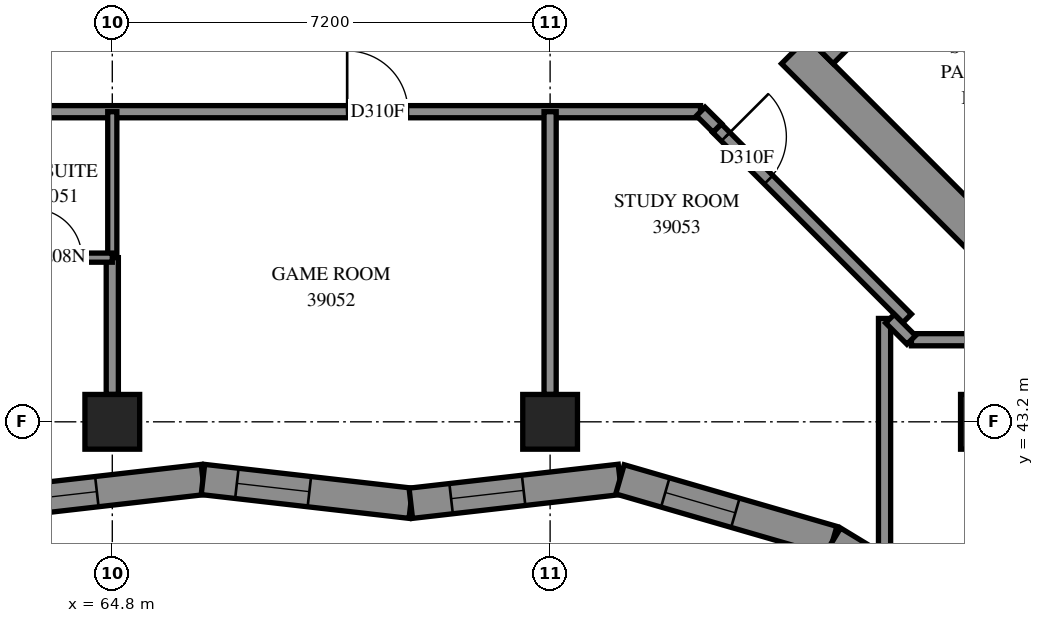
"""IFC4 building model, lengths in metres.
Left out: names, types, materials, properties, quantities, classifications, styles, units other than length and angle.
Written with IfcOpenShell. Run it as: python <this file> out.ifc"""

import sys

from ifc_helpers import new_model, si_unit, direction, frame, frame_2d, origin, origin_2d, place, context, subcontext, project, spatial, polyline, rectangle, outline, extrude, element, fill, save


model = new_model("IFC4")
c1 = context("Model", 3, precision=1e-05, world=origin(), true_north=direction((0.0, 1.0)))
c2 = subcontext(c1, "Body", "Model", "MODEL_VIEW")
j1 = project(units=[si_unit("LENGTHUNIT", "METRE"), si_unit("PLANEANGLEUNIT", "RADIAN")], contexts=[c1])
p1 = place(None, origin())
s1 = spatial("IfcSite", under=j1, at=p1, CompositionType="ELEMENT")
p2 = place(p1, origin())
s2 = spatial("IfcBuilding", under=s1, at=p2, CompositionType="ELEMENT")
p3 = place(p2, frame((0.0, 0.0, 145.6)))
s3 = spatial("IfcBuildingStorey", under=s2, at=p3, CompositionType="ELEMENT", Elevation=145.6)
for number, where, z_axis, x_axis in (
    (1, (64.8, 43.2, 0.0), (0.0, 0.0, 1.0), (1.0, 0.0, 0.0)),
    (2, (72.0, 43.2, 0.0), (0.0, 0.0, 1.0), (1.0, 0.0, 0.0)),
    (3, (79.2, 43.2, 0.0), (0.0, 0.0, 1.0), (1.0, 0.0, 0.0)),
):
    element("IfcColumn", number, at=place(p3, frame(where, z_axis=z_axis, x_axis=x_axis)), inside=s3, PredefinedType="COLUMN", context=c2, shape_type="SweptSolid", body=[
        extrude(rectangle(XDim=0.9, YDim=0.9, at=origin_2d()), origin(), (0.0, 0.0, 1.0), 3.1),
    ])
p4 = place(p3, frame((76.018, 49.302, -0.3), z_axis=(0.0, 0.0, 1.0), x_axis=(0.7071067812, -0.7071067812, 0.0)))
e4 = element("IfcWall", 4, at=p4, inside=s3, PredefinedType="SHEAR", context=c2, shape_type="SweptSolid", body=[
    extrude(rectangle(XDim=15.6, YDim=0.6, at=frame_2d((7.8, 0.0))), origin(), (0.0, 0.0, 1.0), 2.7),
])
p5 = place(p3, frame((76.442, 49.302, -0.3), z_axis=(0.0, 0.0, 1.0), x_axis=(0.7071067812, 0.7071067812, 0.0)))
e5 = element("IfcWall", 5, at=p5, inside=s3, PredefinedType="SHEAR", context=c2, shape_type="SweptSolid", body=[
    extrude(rectangle(XDim=14.4, YDim=0.6, at=frame_2d((7.2, 0.0))), origin(), (0.0, 0.0, 1.0), 2.7),
])
p6 = place(p5, frame((4.55, 0.0, 0.3)))
e6 = element("IfcOpeningElement", 6, at=p6, cuts=e5, PredefinedType="OPENING", context=c2, shape_type="SweptSolid", body=[
    extrude(rectangle(XDim=1.1, YDim=2.1, at=frame_2d((0.55, 1.05))), frame((0.0, 0.31, 0.0), z_axis=(0.0, -1.0, 0.0), x_axis=(1.0, 0.0, 0.0)), (0.0, 0.0, 1.0), 0.62),
])
p7 = place(p5, frame((11.35, 0.0, 0.3)))
e7 = element("IfcOpeningElement", 7, at=p7, cuts=e5, PredefinedType="OPENING", context=c2, shape_type="SweptSolid", body=[
    extrude(rectangle(XDim=1.1, YDim=2.1, at=frame_2d((0.55, 1.05))), frame((0.0, 0.31, 0.0), z_axis=(0.0, -1.0, 0.0), x_axis=(1.0, 0.0, 0.0)), (0.0, 0.0, 1.0), 0.62),
])
p8 = place(p3, frame((62.873, 41.861, 0.0), z_axis=(0.0, 0.0, 1.0), x_axis=(0.9935212381, 0.1136465988, 0.0)))
e8 = element("IfcWall", 8, at=p8, inside=s3, PredefinedType="SOLIDWALL", context=c2, shape_type="SweptSolid", body=[
    extrude(outline(polyline([(-0.029, -0.25), (3.412, -0.25), (3.469, 0.25), (0.029, 0.25), (-0.029, -0.25)])), origin(), (0.0, 0.0, 1.0), 3.1),
])
p9 = place(p8, frame((0.484, 0.0, 0.45)))
e9 = element("IfcOpeningElement", 9, at=p9, cuts=e8, PredefinedType="OPENING", context=c2, shape_type="SweptSolid", body=[
    extrude(rectangle(XDim=1.2, YDim=2.5, at=frame_2d((0.6, 1.25))), frame((0.0, 0.26, 0.0), z_axis=(0.0, -1.0, 0.0), x_axis=(1.0, 0.0, 0.0)), (0.0, 0.0, 1.0), 0.52),
])
p10 = place(p3, frame((66.291, 42.252, 0.0), z_axis=(0.0, 0.0, 1.0), x_axis=(0.9935212381, -0.1136465988, 0.0)))
e10 = element("IfcWall", 10, at=p10, inside=s3, PredefinedType="SOLIDWALL", context=c2, shape_type="SweptSolid", body=[
    extrude(outline(polyline([(0.029, -0.25), (3.469, -0.25), (3.412, 0.25), (-0.029, 0.25), (0.029, -0.25)])), origin(), (0.0, 0.0, 1.0), 3.1),
])
p11 = place(p10, frame((0.561, 0.0, 0.45)))
e11 = element("IfcOpeningElement", 11, at=p11, cuts=e10, PredefinedType="OPENING", context=c2, shape_type="SweptSolid", body=[
    extrude(rectangle(XDim=1.2, YDim=2.5, at=frame_2d((0.6, 1.25))), frame((0.0, 0.26, 0.0), z_axis=(0.0, -1.0, 0.0), x_axis=(1.0, 0.0, 0.0)), (0.0, 0.0, 1.0), 0.52),
])
p12 = place(p3, frame((69.709, 41.861, 0.0), z_axis=(0.0, 0.0, 1.0), x_axis=(0.9935195387, 0.1136614544, 0.0)))
e12 = element("IfcWall", 12, at=p12, inside=s3, PredefinedType="SOLIDWALL", context=c2, shape_type="SweptSolid", body=[
    extrude(outline(polyline([(-0.029, -0.25), (3.412, -0.25), (3.512, 0.25), (0.029, 0.25), (-0.029, -0.25)])), origin(), (0.0, 0.0, 1.0), 3.1),
])
p13 = place(p12, frame((0.667, 0.0, 0.45)))
e13 = element("IfcOpeningElement", 13, at=p13, cuts=e12, PredefinedType="OPENING", context=c2, shape_type="SweptSolid", body=[
    extrude(rectangle(XDim=1.2, YDim=2.5, at=frame_2d((0.6, 1.25))), frame((0.0, 0.26, 0.0), z_axis=(0.0, -1.0, 0.0), x_axis=(1.0, 0.0, 0.0)), (0.0, 0.0, 1.0), 0.52),
])
p14 = place(p3, frame((73.149, 42.254, 0.0), z_axis=(0.0, 0.0, 1.0), x_axis=(0.9604495537, -0.2784540442, 0.0)))
e14 = element("IfcWall", 14, at=p14, inside=s3, PredefinedType="SOLIDWALL", context=c2, shape_type="SweptSolid", body=[
    extrude(outline(polyline([(0.05, -0.25), (3.609, -0.25), (3.675, 0.25), (-0.05, 0.25), (0.05, -0.25)])), origin(), (0.0, 0.0, 1.0), 3.1),
])
p15 = place(p14, frame((0.776, 0.0, 0.45)))
e15 = element("IfcOpeningElement", 15, at=p15, cuts=e14, PredefinedType="OPENING", context=c2, shape_type="SweptSolid", body=[
    extrude(rectangle(XDim=1.2, YDim=2.5, at=frame_2d((0.6, 1.25))), frame((0.0, 0.26, 0.0), z_axis=(0.0, -1.0, 0.0), x_axis=(1.0, 0.0, 0.0)), (0.0, 0.0, 1.0), 0.52),
])
p16 = place(p3, frame((76.647, 41.24, 0.0), z_axis=(0.0, 0.0, 1.0), x_axis=(0.8545971976, -0.5192914691, 0.0)))
e16 = element("IfcWall", 16, at=p16, inside=s3, PredefinedType="SOLIDWALL", context=c2, shape_type="SweptSolid", body=[
    extrude(outline(polyline([(0.033, -0.25), (4.213, -0.25), (4.298, 0.25), (-0.033, 0.25), (0.033, -0.25)])), origin(), (0.0, 0.0, 1.0), 3.1),
])
p17 = place(p16, frame((0.952, 0.0, 0.45)))
e17 = element("IfcOpeningElement", 17, at=p17, cuts=e16, PredefinedType="OPENING", context=c2, shape_type="SweptSolid", body=[
    extrude(rectangle(XDim=1.2, YDim=2.5, at=frame_2d((0.6, 1.25))), frame((0.0, 0.26, 0.0), z_axis=(0.0, -1.0, 0.0), x_axis=(1.0, 0.0, 0.0)), (0.0, 0.0, 1.0), 0.52),
])
p18 = place(p16, frame((2.729, 0.0, 0.45)))
e18 = element("IfcOpeningElement", 18, at=p18, cuts=e16, PredefinedType="OPENING", context=c2, shape_type="SweptSolid", body=[
    extrude(rectangle(XDim=1.2, YDim=2.5, at=frame_2d((0.6, 1.25))), frame((0.0, 0.26, 0.0), z_axis=(0.0, -1.0, 0.0), x_axis=(1.0, 0.0, 0.0)), (0.0, 0.0, 1.0), 0.52),
])
p19 = place(p3, frame((55.5, 48.3, 0.0), z_axis=(0.0, 0.0, 1.0), x_axis=(1.0, 0.0, 0.0)))
e19 = element("IfcWall", 19, at=p19, inside=s3, PredefinedType="PARTITIONING", context=c2, shape_type="SweptSolid", body=[
    extrude(rectangle(XDim=18.974, YDim=0.2, at=frame_2d((9.487, 0.0))), origin(), (0.0, 0.0, 1.0), 3.1),
])
p20 = place(p19, frame((4.4, 0.0, 0.0)))
e20 = element("IfcOpeningElement", 20, at=p20, cuts=e19, PredefinedType="OPENING", context=c2, shape_type="SweptSolid", body=[
    extrude(rectangle(XDim=0.9, YDim=2.1, at=frame_2d((0.45, 1.05))), frame((0.0, 0.11, 0.0), z_axis=(0.0, -1.0, 0.0), x_axis=(1.0, 0.0, 0.0)), (0.0, 0.0, 1.0), 0.22),
])
p21 = place(p19, frame((6.1, 0.0, 0.0)))
e21 = element("IfcOpeningElement", 21, at=p21, cuts=e19, PredefinedType="OPENING", context=c2, shape_type="SweptSolid", body=[
    extrude(rectangle(XDim=0.9, YDim=2.1, at=frame_2d((0.45, 1.05))), frame((0.0, 0.11, 0.0), z_axis=(0.0, -1.0, 0.0), x_axis=(1.0, 0.0, 0.0)), (0.0, 0.0, 1.0), 0.22),
])
p22 = place(p19, frame((13.162, 0.0, 0.0)))
e22 = element("IfcOpeningElement", 22, at=p22, cuts=e19, PredefinedType="OPENING", context=c2, shape_type="SweptSolid", body=[
    extrude(rectangle(XDim=1.0, YDim=2.1, at=frame_2d((0.5, 1.05))), frame((0.0, 0.11, 0.0), z_axis=(0.0, -1.0, 0.0), x_axis=(1.0, 0.0, 0.0)), (0.0, 0.0, 1.0), 0.22),
])
p23 = place(p3, frame((72.0, 43.65, 0.0), z_axis=(0.0, 0.0, 1.0), x_axis=(0.0, 1.0, 0.0)))
e23 = element("IfcWall", 23, at=p23, inside=s3, PredefinedType="PARTITIONING", context=c2, shape_type="SweptSolid", body=[
    extrude(rectangle(XDim=4.65, YDim=0.2, at=frame_2d((2.325, 0.0))), origin(), (0.0, 0.0, 1.0), 3.1),
])
p24 = place(p3, frame((74.745, 48.029, 0.0), z_axis=(0.0, 0.0, 1.0), x_axis=(0.7068806156, -0.7073328745, 0.0)))
e24 = element("IfcWall", 24, at=p24, inside=s3, PredefinedType="PARTITIONING", context=c2, shape_type="SweptSolid", body=[
    extrude(rectangle(XDim=4.422, YDim=0.2, at=frame_2d((2.211, 0.0))), origin(), (0.0, 0.0, 1.0), 3.1),
])
p25 = place(p24, frame((0.199, 0.0, 0.0)))
e25 = element("IfcOpeningElement", 25, at=p25, cuts=e24, PredefinedType="OPENING", context=c2, shape_type="SweptSolid", body=[
    extrude(rectangle(XDim=1.0, YDim=2.1, at=frame_2d((0.5, 1.05))), frame((0.0, 0.11, 0.0), z_axis=(0.0, -1.0, 0.0), x_axis=(1.0, 0.0, 0.0)), (0.0, 0.0, 1.0), 0.22),
])
p26 = place(p3, frame((77.5, 41.014, 0.0), z_axis=(0.0, 0.0, 1.0), x_axis=(0.0, 1.0, 0.0)))
e26 = element("IfcWall", 26, at=p26, inside=s3, PredefinedType="PARTITIONING", context=c2, shape_type="SweptSolid", body=[
    extrude(rectangle(XDim=3.886, YDim=0.2, at=frame_2d((1.943, 0.0))), origin(), (0.0, 0.0, 1.0), 3.1),
])
p27 = place(p3, frame((64.8, 45.9, 0.0), z_axis=(0.0, 0.0, 1.0), x_axis=(0.0, 1.0, 0.0)))
e27 = element("IfcWall", 27, at=p27, inside=s3, PredefinedType="PARTITIONING", context=c2, shape_type="SweptSolid", body=[
    extrude(rectangle(XDim=2.4, YDim=0.15, at=frame_2d((1.2, 0.0))), origin(), (0.0, 0.0, 1.0), 3.1),
])
p28 = place(p3, frame((77.942, 44.55, 0.0), z_axis=(0.0, 0.0, 1.0), x_axis=(1.0, 0.0, 0.0)))
e28 = element("IfcWall", 28, at=p28, inside=s3, PredefinedType="PARTITIONING", context=c2, shape_type="SweptSolid", body=[
    extrude(rectangle(XDim=2.29, YDim=0.2, at=frame_2d((1.145, 0.0))), origin(), (0.0, 0.0, 1.0), 3.1),
])
p29 = place(p3, frame((64.8, 43.65, 0.0), z_axis=(0.0, 0.0, 1.0), x_axis=(0.0, 1.0, 0.0)))
e29 = element("IfcWall", 29, at=p29, inside=s3, PredefinedType="PARTITIONING", context=c2, shape_type="SweptSolid", body=[
    extrude(rectangle(XDim=2.25, YDim=0.2, at=frame_2d((1.125, 0.0))), origin(), (0.0, 0.0, 1.0), 3.1),
])
p30 = place(p3, frame((62.9, 45.9, 0.0), z_axis=(0.0, 0.0, 1.0), x_axis=(1.0, 0.0, 0.0)))
e30 = element("IfcWall", 30, at=p30, inside=s3, PredefinedType="PARTITIONING", context=c2, shape_type="SweptSolid", body=[
    extrude(rectangle(XDim=1.9, YDim=0.15, at=frame_2d((0.95, 0.0))), origin(), (0.0, 0.0, 1.0), 3.1),
])
p31 = place(p30, frame((0.598, 0.0, 0.0)))
e31 = element("IfcOpeningElement", 31, at=p31, cuts=e30, PredefinedType="OPENING", context=c2, shape_type="SweptSolid", body=[
    extrude(rectangle(XDim=0.8, YDim=2.1, at=frame_2d((0.4, 1.05))), frame((0.0, 0.085, 0.0), z_axis=(0.0, -1.0, 0.0), x_axis=(1.0, 0.0, 0.0)), (0.0, 0.0, 1.0), 0.17),
])
p32 = place(p3, frame((77.588, 44.897, 0.0), z_axis=(0.0, 0.0, 1.0), x_axis=(0.7071067812, -0.7071067812, 0.0)))
e32 = element("IfcWall", 32, at=p32, inside=s3, PredefinedType="PARTITIONING", context=c2, shape_type="SweptSolid", body=[
    extrude(rectangle(XDim=0.495, YDim=0.2, at=frame_2d((0.247, 0.0))), origin(), (0.0, 0.0, 1.0), 3.1),
])
p33 = place(p3, frame((74.477, 48.303, 0.0), z_axis=(0.0, 0.0, 1.0), x_axis=(0.7097111995, -0.7044927348, 0.0)))
e33 = element("IfcWall", 33, at=p33, inside=s3, PredefinedType="PARTITIONING", context=c2, shape_type="SweptSolid", body=[
    extrude(rectangle(XDim=0.383, YDim=0.2, at=frame_2d((0.192, 0.0))), origin(), (0.0, 0.0, 1.0), 3.1),
])
p34 = place(p9, origin())
e34 = element("IfcWindow", 34, at=p34, inside=s3, PartitioningType="SINGLE_PANEL", PredefinedType="WINDOW", context=c2, shape_type="SweptSolid", body=[
    extrude(rectangle(XDim=1.2, YDim=2.5, at=frame_2d((0.6, 1.25))), frame((0.0, 0.18, 0.0), z_axis=(0.0, -1.0, 0.0), x_axis=(1.0, 0.0, 0.0)), (0.0, 0.0, 1.0), 0.06),
])
fill(e9, e34)
p35 = place(p11, origin())
e35 = element("IfcWindow", 35, at=p35, inside=s3, PartitioningType="SINGLE_PANEL", PredefinedType="WINDOW", context=c2, shape_type="SweptSolid", body=[
    extrude(rectangle(XDim=1.2, YDim=2.5, at=frame_2d((0.6, 1.25))), frame((0.0, 0.18, 0.0), z_axis=(0.0, -1.0, 0.0), x_axis=(1.0, 0.0, 0.0)), (0.0, 0.0, 1.0), 0.06),
])
fill(e11, e35)
p36 = place(p13, origin())
e36 = element("IfcWindow", 36, at=p36, inside=s3, PartitioningType="SINGLE_PANEL", PredefinedType="WINDOW", context=c2, shape_type="SweptSolid", body=[
    extrude(rectangle(XDim=1.2, YDim=2.5, at=frame_2d((0.6, 1.25))), frame((0.0, 0.18, 0.0), z_axis=(0.0, -1.0, 0.0), x_axis=(1.0, 0.0, 0.0)), (0.0, 0.0, 1.0), 0.06),
])
fill(e13, e36)
p37 = place(p15, origin())
e37 = element("IfcWindow", 37, at=p37, inside=s3, PartitioningType="SINGLE_PANEL", PredefinedType="WINDOW", context=c2, shape_type="SweptSolid", body=[
    extrude(rectangle(XDim=1.2, YDim=2.5, at=frame_2d((0.6, 1.25))), frame((0.0, 0.18, 0.0), z_axis=(0.0, -1.0, 0.0), x_axis=(1.0, 0.0, 0.0)), (0.0, 0.0, 1.0), 0.06),
])
fill(e15, e37)
p38 = place(p31, origin())
e38 = element("IfcDoor", 38, at=p38, inside=s3, OperationType="SINGLE_SWING_RIGHT", PredefinedType="DOOR", context=c2, shape_type="SweptSolid", body=[
    extrude(rectangle(XDim=0.8, YDim=2.1, at=frame_2d((0.4, 1.05))), frame((0.0, 0.025, 0.0), z_axis=(0.0, -1.0, 0.0), x_axis=(1.0, 0.0, 0.0)), (0.0, 0.0, 1.0), 0.05),
])
fill(e31, e38)
p39 = place(p22, origin())
e39 = element("IfcDoor", 39, at=p39, inside=s3, OperationType="SINGLE_SWING_LEFT", PredefinedType="DOOR", context=c2, shape_type="SweptSolid", body=[
    extrude(rectangle(XDim=1.0, YDim=2.1, at=frame_2d((0.5, 1.05))), frame((0.0, 0.025, 0.0), z_axis=(0.0, -1.0, 0.0), x_axis=(1.0, 0.0, 0.0)), (0.0, 0.0, 1.0), 0.05),
])
fill(e22, e39)
p40 = place(p25, origin())
e40 = element("IfcDoor", 40, at=p40, inside=s3, OperationType="SINGLE_SWING_LEFT", PredefinedType="DOOR", context=c2, shape_type="SweptSolid", body=[
    extrude(rectangle(XDim=1.0, YDim=2.1, at=frame_2d((0.5, 1.05))), frame((0.0, 0.025, 0.0), z_axis=(0.0, -1.0, 0.0), x_axis=(1.0, 0.0, 0.0)), (0.0, 0.0, 1.0), 0.05),
])
fill(e25, e40)
save(model, sys.argv[1])
